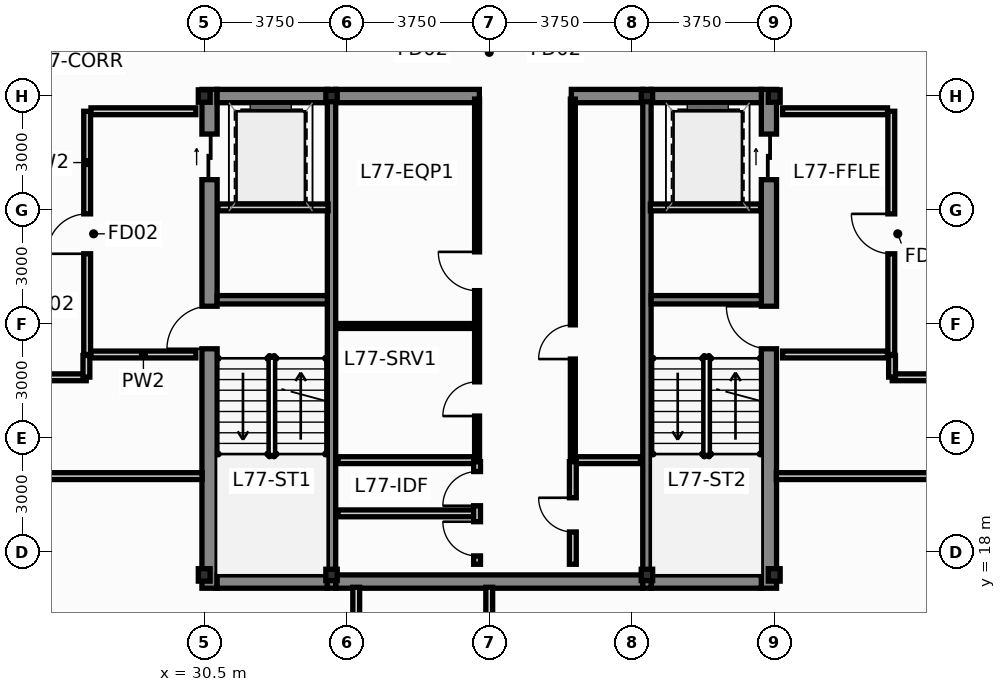
"""IFC4 building model, lengths in metres.
Left out: names, types, materials, properties, quantities, classifications, styles, units other than length and angle.
Written with IfcOpenShell. Run it as: python <this file> out.ifc"""

import sys

from ifc_helpers import new_model, si_unit, direction, frame, frame_2d, origin, origin_2d, place, context, subcontext, project, spatial, rectangle, hollow_rectangle, i_section, extrude, source, transform, mapped, element, fill, save


model = new_model("IFC4")
c1 = context("Model", 3, precision=1e-05, world=origin(), true_north=direction((0.0, 1.0)))
c2 = subcontext(c1, "Body", "Model", "MODEL_VIEW")
j1 = project(units=[si_unit("LENGTHUNIT", "METRE"), si_unit("PLANEANGLEUNIT", "RADIAN")], contexts=[c1])
p1 = place(None, origin())
s1 = spatial("IfcSite", under=j1, at=p1, CompositionType="ELEMENT")
p2 = place(p1, origin())
s2 = spatial("IfcBuilding", under=s1, at=p2, CompositionType="ELEMENT")
p3 = place(p2, frame((0.0, 0.0, 293.2)))
s3 = spatial("IfcBuildingStorey", under=s2, at=p3, CompositionType="ELEMENT", Elevation=293.2)
m1 = source(origin(), c2, "Body", "SweptSolid", [
    extrude(i_section(OverallWidth=0.311, OverallDepth=0.327, WebThickness=0.016, FlangeThickness=0.025, at=origin_2d()), origin(), (0.0, 0.0, 1.0), 3.4),
])
for number, where, z_axis, x_axis in (
    (1, (30.5, 17.4, 0.0), (0.0, 0.0, 1.0), (1.0, 0.0, 0.0)),
    (2, (45.5, 17.4, 0.0), (0.0, 0.0, 1.0), (1.0, 0.0, 0.0)),
    (3, (45.5, 30.0, 0.0), (0.0, 0.0, 1.0), (1.0, 0.0, 0.0)),
    (4, (30.5, 30.0, 0.0), (0.0, 0.0, 1.0), (1.0, 0.0, 0.0)),
):
    element("IfcColumn", number, at=place(p3, frame(where, z_axis=z_axis, x_axis=x_axis)), inside=s3, PredefinedType="COLUMN", context=c2, shape_type="MappedRepresentation", body=[
        mapped(m1, transform((0.0, 0.0, 0.0), scale=1.0)),
    ])
m2 = source(origin(), c2, "Body", "SweptSolid", [
    extrude(hollow_rectangle(XDim=0.3, YDim=0.3, WallThickness=0.012, at=origin_2d()), origin(), (0.0, 0.0, 1.0), 3.4),
])
for number, where, z_axis, x_axis in (
    (5, (33.85, 17.4, 0.0), (0.0, 0.0, 1.0), (1.0, 0.0, 0.0)),
    (6, (42.15, 17.4, 0.0), (0.0, 0.0, 1.0), (1.0, 0.0, 0.0)),
    (7, (33.85, 30.0, 0.0), (0.0, 0.0, 1.0), (1.0, 0.0, 0.0)),
    (8, (42.15, 30.0, 0.0), (0.0, 0.0, 1.0), (1.0, 0.0, 0.0)),
):
    element("IfcColumn", number, at=place(p3, frame(where, z_axis=z_axis, x_axis=x_axis)), inside=s3, PredefinedType="COLUMN", context=c2, shape_type="MappedRepresentation", body=[
        mapped(m2, transform((0.0, 0.0, 0.0), scale=1.0)),
    ])
p4 = place(p3, frame((30.64, 17.05, 0.0), z_axis=(0.0, 0.0, 1.0), x_axis=(0.0, 1.0, 0.0)))
e9 = element("IfcWall", 9, at=p4, inside=s3, PredefinedType="SHEAR", context=c2, shape_type="SweptSolid", body=[
    extrude(rectangle(XDim=13.125, YDim=0.4, at=frame_2d((6.562, 0.0))), origin(), (0.0, 0.0, 1.0), 3.4),
])
p5 = place(p4, frame((6.3, 0.0, 0.0)))
e10 = element("IfcOpeningElement", 10, at=p5, cuts=e9, PredefinedType="OPENING", context=c2, shape_type="SweptSolid", body=[
    extrude(rectangle(XDim=1.12, YDim=2.15, at=frame_2d((0.56, 1.075))), frame((0.0, 0.212, 0.0), z_axis=(0.0, -1.0, 0.0), x_axis=(1.0, 0.0, 0.0)), (0.0, 0.0, 1.0), 0.424),
])
p6 = place(p4, frame((10.75, 0.0, 0.0)))
e11 = element("IfcOpeningElement", 11, at=p6, cuts=e9, PredefinedType="OPENING", context=c2, shape_type="SweptSolid", body=[
    extrude(rectangle(XDim=1.2, YDim=2.2, at=frame_2d((0.6, 1.1))), frame((0.0, 0.212, 0.0), z_axis=(0.0, -1.0, 0.0), x_axis=(1.0, 0.0, 0.0)), (0.0, 0.0, 1.0), 0.424),
])
p7 = place(p3, frame((45.36, 17.05, 0.0), z_axis=(0.0, 0.0, 1.0), x_axis=(0.0, 1.0, 0.0)))
e12 = element("IfcWall", 12, at=p7, inside=s3, PredefinedType="SHEAR", context=c2, shape_type="SweptSolid", body=[
    extrude(rectangle(XDim=13.125, YDim=0.4, at=frame_2d((6.562, 0.0))), origin(), (0.0, 0.0, 1.0), 3.4),
])
p8 = place(p7, frame((6.3, 0.0, 0.0)))
e13 = element("IfcOpeningElement", 13, at=p8, cuts=e12, PredefinedType="OPENING", context=c2, shape_type="SweptSolid", body=[
    extrude(rectangle(XDim=1.12, YDim=2.15, at=frame_2d((0.56, 1.075))), frame((0.0, 0.212, 0.0), z_axis=(0.0, -1.0, 0.0), x_axis=(1.0, 0.0, 0.0)), (0.0, 0.0, 1.0), 0.424),
])
p9 = place(p7, frame((10.75, 0.0, 0.0)))
e14 = element("IfcOpeningElement", 14, at=p9, cuts=e12, PredefinedType="OPENING", context=c2, shape_type="SweptSolid", body=[
    extrude(rectangle(XDim=1.2, YDim=2.2, at=frame_2d((0.6, 1.1))), frame((0.0, 0.212, 0.0), z_axis=(0.0, -1.0, 0.0), x_axis=(1.0, 0.0, 0.0)), (0.0, 0.0, 1.0), 0.424),
])
p10 = place(p3, frame((30.84, 17.225, 0.0), z_axis=(0.0, 0.0, 1.0), x_axis=(1.0, 0.0, 0.0)))
e15 = element("IfcWall", 15, at=p10, inside=s3, PredefinedType="SHEAR", context=c2, shape_type="SweptSolid", body=[
    extrude(rectangle(XDim=2.9, YDim=0.35, at=frame_2d((1.45, 0.0))), origin(), (0.0, 0.0, 1.0), 3.4),
])
p11 = place(p3, frame((33.96, 17.225, 0.0), z_axis=(0.0, 0.0, 1.0), x_axis=(1.0, 0.0, 0.0)))
e16 = element("IfcWall", 16, at=p11, inside=s3, PredefinedType="SHEAR", context=c2, shape_type="SweptSolid", body=[
    extrude(rectangle(XDim=8.08, YDim=0.35, at=frame_2d((4.04, 0.0))), origin(), (0.0, 0.0, 1.0), 3.4),
])
for number, where, z_axis, x_axis in (
    (17, (42.26, 17.225, 0.0), (0.0, 0.0, 1.0), (1.0, 0.0, 0.0)),
    (18, (30.84, 30.0, 0.0), (0.0, 0.0, 1.0), (1.0, 0.0, 0.0)),
):
    element("IfcWall", number, at=place(p3, frame(where, z_axis=z_axis, x_axis=x_axis)), inside=s3, PredefinedType="SHEAR", context=c2, shape_type="SweptSolid", body=[
        extrude(rectangle(XDim=2.9, YDim=0.35, at=frame_2d((1.45, 0.0))), origin(), (0.0, 0.0, 1.0), 3.4),
    ])
p12 = place(p3, frame((33.96, 30.0, 0.0), z_axis=(0.0, 0.0, 1.0), x_axis=(1.0, 0.0, 0.0)))
e19 = element("IfcWall", 19, at=p12, inside=s3, PredefinedType="SHEAR", context=c2, shape_type="SweptSolid", body=[
    extrude(rectangle(XDim=3.78, YDim=0.35, at=frame_2d((1.89, 0.0))), origin(), (0.0, 0.0, 1.0), 3.4),
])
p13 = place(p3, frame((40.16, 30.0, 0.0), z_axis=(0.0, 0.0, 1.0), x_axis=(1.0, 0.0, 0.0)))
e20 = element("IfcWall", 20, at=p13, inside=s3, PredefinedType="SHEAR", context=c2, shape_type="SweptSolid", body=[
    extrude(rectangle(XDim=1.88, YDim=0.35, at=frame_2d((0.94, 0.0))), origin(), (0.0, 0.0, 1.0), 3.4),
])
p14 = place(p3, frame((42.26, 30.0, 0.0), z_axis=(0.0, 0.0, 1.0), x_axis=(1.0, 0.0, 0.0)))
e21 = element("IfcWall", 21, at=p14, inside=s3, PredefinedType="SHEAR", context=c2, shape_type="SweptSolid", body=[
    extrude(rectangle(XDim=2.9, YDim=0.35, at=frame_2d((1.45, 0.0))), origin(), (0.0, 0.0, 1.0), 3.4),
])
for number, where, z_axis, x_axis in (
    (22, (33.85, 17.05, 0.0), (0.0, 0.0, 1.0), (0.0, 1.0, 0.0)),
    (23, (42.15, 17.05, 0.0), (0.0, 0.0, 1.0), (0.0, 1.0, 0.0)),
):
    element("IfcWall", number, at=place(p3, frame(where, z_axis=z_axis, x_axis=x_axis)), inside=s3, PredefinedType="SHEAR", context=c2, shape_type="SweptSolid", body=[
        extrude(rectangle(XDim=13.125, YDim=0.22, at=frame_2d((6.562, 0.0))), origin(), (0.0, 0.0, 1.0), 3.4),
    ])
for number, where, z_axis, x_axis in (
    (24, (30.84, 24.64, 0.0), (0.0, 0.0, 1.0), (1.0, 0.0, 0.0)),
    (25, (42.26, 24.64, 0.0), (0.0, 0.0, 1.0), (1.0, 0.0, 0.0)),
):
    element("IfcWall", number, at=place(p3, frame(where, z_axis=z_axis, x_axis=x_axis)), inside=s3, PredefinedType="SHEAR", context=c2, shape_type="SweptSolid", body=[
        extrude(rectangle(XDim=2.9, YDim=0.22, at=frame_2d((1.45, 0.0))), origin(), (0.0, 0.0, 1.0), 3.4),
    ])
p15 = place(p3, frame((27.42, 23.2, 0.0), z_axis=(0.0, 0.0, 1.0), x_axis=(0.0, 1.0, 0.0)))
e26 = element("IfcWall", 26, at=p15, inside=s3, PredefinedType="PARTITIONING", context=c2, shape_type="SweptSolid", body=[
    extrude(rectangle(XDim=6.4, YDim=0.18, at=frame_2d((3.2, 0.0))), origin(), (0.0, 0.0, 1.0), 2.835),
])
p16 = place(p15, frame((2.65, 0.0, 0.0)))
e27 = element("IfcOpeningElement", 27, at=p16, cuts=e26, PredefinedType="OPENING", context=c2, shape_type="SweptSolid", body=[
    extrude(rectangle(XDim=1.05, YDim=2.15, at=frame_2d((0.525, 1.075))), frame((0.0, 0.102, 0.0), z_axis=(0.0, -1.0, 0.0), x_axis=(1.0, 0.0, 0.0)), (0.0, 0.0, 1.0), 0.204),
])
for number, where, z_axis, x_axis in (
    (28, (27.52, 23.2, 0.0), (0.0, 0.0, 1.0), (1.0, 0.0, 0.0)),
    (29, (27.52, 29.6, 0.0), (0.0, 0.0, 1.0), (1.0, 0.0, 0.0)),
):
    element("IfcWall", number, at=place(p3, frame(where, z_axis=z_axis, x_axis=x_axis)), inside=s3, PredefinedType="PARTITIONING", context=c2, shape_type="SweptSolid", body=[
        extrude(rectangle(XDim=2.76, YDim=0.18, at=frame_2d((1.38, 0.0))), origin(), (0.0, 0.0, 1.0), 3.15),
    ])
p17 = place(p3, frame((48.58, 23.2, 0.0), z_axis=(0.0, 0.0, 1.0), x_axis=(0.0, 1.0, 0.0)))
e30 = element("IfcWall", 30, at=p17, inside=s3, PredefinedType="PARTITIONING", context=c2, shape_type="SweptSolid", body=[
    extrude(rectangle(XDim=6.4, YDim=0.18, at=frame_2d((3.2, 0.0))), origin(), (0.0, 0.0, 1.0), 2.835),
])
p18 = place(p17, frame((2.65, 0.0, 0.0)))
e31 = element("IfcOpeningElement", 31, at=p18, cuts=e30, PredefinedType="OPENING", context=c2, shape_type="SweptSolid", body=[
    extrude(rectangle(XDim=1.05, YDim=2.15, at=frame_2d((0.525, 1.075))), frame((0.0, 0.102, 0.0), z_axis=(0.0, -1.0, 0.0), x_axis=(1.0, 0.0, 0.0)), (0.0, 0.0, 1.0), 0.204),
])
for number, where, z_axis, x_axis in (
    (32, (45.72, 23.2, 0.0), (0.0, 0.0, 1.0), (1.0, 0.0, 0.0)),
    (33, (45.72, 29.6, 0.0), (0.0, 0.0, 1.0), (1.0, 0.0, 0.0)),
):
    element("IfcWall", number, at=place(p3, frame(where, z_axis=z_axis, x_axis=x_axis)), inside=s3, PredefinedType="PARTITIONING", context=c2, shape_type="SweptSolid", body=[
        extrude(rectangle(XDim=2.76, YDim=0.18, at=frame_2d((1.38, 0.0))), origin(), (0.0, 0.0, 1.0), 3.15),
    ])
for number, where, z_axis, x_axis in (
    (34, (30.86, 27.07, 0.0), (0.0, 0.0, 1.0), (1.0, 0.0, 0.0)),
    (35, (42.24, 27.07, 0.0), (0.0, 0.0, 1.0), (1.0, 0.0, 0.0)),
):
    element("IfcWall", number, at=place(p3, frame(where, z_axis=z_axis, x_axis=x_axis)), inside=s3, PredefinedType="PARTITIONING", context=c2, shape_type="SweptSolid", body=[
        extrude(rectangle(XDim=2.9, YDim=0.18, at=frame_2d((1.45, 0.0))), origin(), (0.0, 0.0, 1.0), 3.15),
    ])
p19 = place(p3, frame((34.02, 20.42, 0.0), z_axis=(0.0, 0.0, 1.0), x_axis=(1.0, 0.0, 0.0)))
e36 = element("IfcWall", 36, at=p19, inside=s3, PredefinedType="PARTITIONING", context=c2, shape_type="SweptSolid", body=[
    extrude(rectangle(XDim=3.64, YDim=0.18, at=frame_2d((1.82, 0.0))), origin(), (0.0, 0.0, 1.0), 3.15),
])
p20 = place(p3, frame((40.22, 20.42, 0.0), z_axis=(0.0, 0.0, 1.0), x_axis=(1.0, 0.0, 0.0)))
e37 = element("IfcWall", 37, at=p20, inside=s3, PredefinedType="PARTITIONING", context=c2, shape_type="SweptSolid", body=[
    extrude(rectangle(XDim=1.76, YDim=0.18, at=frame_2d((0.88, 0.0))), origin(), (0.0, 0.0, 1.0), 3.15),
])
p21 = place(p3, frame((34.02, 23.95, 0.0), z_axis=(0.0, 0.0, 1.0), x_axis=(1.0, 0.0, 0.0)))
e38 = element("IfcWall", 38, at=p21, inside=s3, PredefinedType="PARTITIONING", context=c2, shape_type="SweptSolid", body=[
    extrude(rectangle(XDim=3.58, YDim=0.13, at=frame_2d((1.79, 0.0))), origin(), (0.0, 0.0, 1.0), 3.15),
])
p22 = place(p3, frame((37.68, 20.48, 0.0), z_axis=(0.0, 0.0, 1.0), x_axis=(0.0, 1.0, 0.0)))
e39 = element("IfcWall", 39, at=p22, inside=s3, PredefinedType="PARTITIONING", context=c2, shape_type="SweptSolid", body=[
    extrude(rectangle(XDim=9.44, YDim=0.13, at=frame_2d((4.72, 0.0))), origin(), (0.0, 0.0, 1.0), 3.15),
])
p23 = place(p22, frame((1.1, 0.0, 0.0)))
e40 = element("IfcOpeningElement", 40, at=p23, cuts=e39, PredefinedType="OPENING", context=c2, shape_type="SweptSolid", body=[
    extrude(rectangle(XDim=0.9, YDim=2.1, at=frame_2d((0.45, 1.05))), frame((0.0, 0.077, 0.0), z_axis=(0.0, -1.0, 0.0), x_axis=(1.0, 0.0, 0.0)), (0.0, 0.0, 1.0), 0.154),
])
p24 = place(p22, frame((4.4, 0.0, 0.0)))
e41 = element("IfcOpeningElement", 41, at=p24, cuts=e39, PredefinedType="OPENING", context=c2, shape_type="SweptSolid", body=[
    extrude(rectangle(XDim=1.02, YDim=2.15, at=frame_2d((0.51, 1.075))), frame((0.0, 0.077, 0.0), z_axis=(0.0, -1.0, 0.0), x_axis=(1.0, 0.0, 0.0)), (0.0, 0.0, 1.0), 0.154),
])
p25 = place(p3, frame((40.2, 20.48, 0.0), z_axis=(0.0, 0.0, 1.0), x_axis=(0.0, 1.0, 0.0)))
e42 = element("IfcWall", 42, at=p25, inside=s3, PredefinedType="PARTITIONING", context=c2, shape_type="SweptSolid", body=[
    extrude(rectangle(XDim=9.44, YDim=0.13, at=frame_2d((4.72, 0.0))), origin(), (0.0, 0.0, 1.0), 3.15),
])
p26 = place(p25, frame((2.6, 0.0, 0.0)))
e43 = element("IfcOpeningElement", 43, at=p26, cuts=e42, PredefinedType="OPENING", context=c2, shape_type="SweptSolid", body=[
    extrude(rectangle(XDim=0.9, YDim=2.1, at=frame_2d((0.45, 1.05))), frame((0.0, 0.077, 0.0), z_axis=(0.0, -1.0, 0.0), x_axis=(1.0, 0.0, 0.0)), (0.0, 0.0, 1.0), 0.154),
])
p27 = place(p3, frame((34.02, 19.02, 0.0), z_axis=(0.0, 0.0, 1.0), x_axis=(1.0, 0.0, 0.0)))
e44 = element("IfcWall", 44, at=p27, inside=s3, PredefinedType="PARTITIONING", context=c2, shape_type="SweptSolid", body=[
    extrude(rectangle(XDim=3.58, YDim=0.18, at=frame_2d((1.79, 0.0))), origin(), (0.0, 0.0, 1.0), 3.15),
])
p28 = place(p3, frame((37.68, 17.68, 0.0), z_axis=(0.0, 0.0, 1.0), x_axis=(0.0, 1.0, 0.0)))
e45 = element("IfcWall", 45, at=p28, inside=s3, PredefinedType="PARTITIONING", context=c2, shape_type="SweptSolid", body=[
    extrude(rectangle(XDim=2.7, YDim=0.18, at=frame_2d((1.35, 0.0))), origin(), (0.0, 0.0, 1.0), 3.15),
])
p29 = place(p28, frame((0.22, 0.0, 0.0)))
e46 = element("IfcOpeningElement", 46, at=p29, cuts=e45, PredefinedType="OPENING", context=c2, shape_type="SweptSolid", body=[
    extrude(rectangle(XDim=0.9, YDim=2.1, at=frame_2d((0.45, 1.05))), frame((0.0, 0.102, 0.0), z_axis=(0.0, -1.0, 0.0), x_axis=(1.0, 0.0, 0.0)), (0.0, 0.0, 1.0), 0.204),
])
p30 = place(p28, frame((1.54, 0.0, 0.0)))
e47 = element("IfcOpeningElement", 47, at=p30, cuts=e45, PredefinedType="OPENING", context=c2, shape_type="SweptSolid", body=[
    extrude(rectangle(XDim=0.9, YDim=2.1, at=frame_2d((0.45, 1.05))), frame((0.0, 0.102, 0.0), z_axis=(0.0, -1.0, 0.0), x_axis=(1.0, 0.0, 0.0)), (0.0, 0.0, 1.0), 0.204),
])
p31 = place(p3, frame((40.2, 17.68, 0.0), z_axis=(0.0, 0.0, 1.0), x_axis=(0.0, 1.0, 0.0)))
e48 = element("IfcWall", 48, at=p31, inside=s3, PredefinedType="PARTITIONING", context=c2, shape_type="SweptSolid", body=[
    extrude(rectangle(XDim=2.7, YDim=0.18, at=frame_2d((1.35, 0.0))), origin(), (0.0, 0.0, 1.0), 3.15),
])
p32 = place(p31, frame((0.85, 0.0, 0.0)))
e49 = element("IfcOpeningElement", 49, at=p32, cuts=e48, PredefinedType="OPENING", context=c2, shape_type="SweptSolid", body=[
    extrude(rectangle(XDim=0.9, YDim=2.1, at=frame_2d((0.45, 1.05))), frame((0.0, 0.102, 0.0), z_axis=(0.0, -1.0, 0.0), x_axis=(1.0, 0.0, 0.0)), (0.0, 0.0, 1.0), 0.204),
])
p33 = place(p3, frame((17.68, 20.0, 0.0), z_axis=(0.0, 0.0, 1.0), x_axis=(1.0, 0.0, 0.0)))
e50 = element("IfcWall", 50, at=p33, inside=s3, PredefinedType="PARTITIONING", context=c2, shape_type="SweptSolid", body=[
    extrude(rectangle(XDim=12.765, YDim=0.18, at=frame_2d((6.383, 0.0))), origin(), (0.0, 0.0, 1.0), 3.15),
])
p34 = place(p33, frame((5.857, 0.0, 0.0)))
e51 = element("IfcOpeningElement", 51, at=p34, cuts=e50, PredefinedType="OPENING", context=c2, shape_type="SweptSolid", body=[
    extrude(rectangle(XDim=1.05, YDim=2.15, at=frame_2d((0.525, 1.075))), frame((0.0, 0.102, 0.0), z_axis=(0.0, -1.0, 0.0), x_axis=(1.0, 0.0, 0.0)), (0.0, 0.0, 1.0), 0.204),
])
p35 = place(p3, frame((45.555, 20.0, 0.0), z_axis=(0.0, 0.0, 1.0), x_axis=(1.0, 0.0, 0.0)))
e52 = element("IfcWall", 52, at=p35, inside=s3, PredefinedType="PARTITIONING", context=c2, shape_type="SweptSolid", body=[
    extrude(rectangle(XDim=11.635, YDim=0.18, at=frame_2d((5.817, 0.0))), origin(), (0.0, 0.0, 1.0), 3.15),
])
p36 = place(p35, frame((5.292, 0.0, 0.0)))
e53 = element("IfcOpeningElement", 53, at=p36, cuts=e52, PredefinedType="OPENING", context=c2, shape_type="SweptSolid", body=[
    extrude(rectangle(XDim=1.05, YDim=2.15, at=frame_2d((0.525, 1.075))), frame((0.0, 0.102, 0.0), z_axis=(0.0, -1.0, 0.0), x_axis=(1.0, 0.0, 0.0)), (0.0, 0.0, 1.0), 0.204),
])
p37 = place(p3, frame((34.5, 8.85, 0.0), z_axis=(0.0, 0.0, 1.0), x_axis=(0.0, 1.0, 0.0)))
e54 = element("IfcWall", 54, at=p37, inside=s3, PredefinedType="PARTITIONING", context=c2, shape_type="SweptSolid", body=[
    extrude(rectangle(XDim=8.225, YDim=0.18, at=frame_2d((4.112, 0.0))), origin(), (0.0, 0.0, 1.0), 3.15),
])
p38 = place(p37, frame((3.587, 0.0, 0.0)))
e55 = element("IfcOpeningElement", 55, at=p38, cuts=e54, PredefinedType="OPENING", context=c2, shape_type="SweptSolid", body=[
    extrude(rectangle(XDim=1.05, YDim=2.15, at=frame_2d((0.525, 1.075))), frame((0.0, 0.102, 0.0), z_axis=(0.0, -1.0, 0.0), x_axis=(1.0, 0.0, 0.0)), (0.0, 0.0, 1.0), 0.204),
])
p39 = place(p3, frame((38.0, 8.94, 0.0), z_axis=(0.0, 0.0, 1.0), x_axis=(0.0, 1.0, 0.0)))
e56 = element("IfcWall", 56, at=p39, inside=s3, PredefinedType="PARTITIONING", context=c2, shape_type="SweptSolid", body=[
    extrude(rectangle(XDim=8.135, YDim=0.18, at=frame_2d((4.067, 0.0))), origin(), (0.0, 0.0, 1.0), 3.15),
])
for number, where, z_axis, x_axis in (
    (57, (27.395, 22.6, 0.0), (0.0, 0.0, 1.0), (-1.0, 0.0, 0.0)),
    (58, (48.605, 22.6, 0.0), (0.0, 0.0, 1.0), (1.0, 0.0, 0.0)),
):
    element("IfcWall", number, at=place(p3, frame(where, z_axis=z_axis, x_axis=x_axis)), inside=s3, PredefinedType="PARTITIONING", context=c2, shape_type="SweptSolid", body=[
        extrude(rectangle(XDim=1.99, YDim=0.18, at=frame_2d((0.995, 0.0))), origin(), (0.0, 0.0, 1.0), 3.15),
    ])
for number, where, z_axis, x_axis in (
    (59, (27.4, 23.175, 0.0), (0.0, 0.0, 1.0), (0.0, -1.0, 0.0)),
    (60, (48.6, 23.175, 0.0), (0.0, 0.0, 1.0), (0.0, -1.0, 0.0)),
):
    element("IfcWall", number, at=place(p3, frame(where, z_axis=z_axis, x_axis=x_axis)), inside=s3, PredefinedType="PARTITIONING", context=c2, shape_type="SweptSolid", body=[
        extrude(rectangle(XDim=0.57, YDim=0.18, at=frame_2d((0.285, 0.0))), origin(), (0.0, 0.0, 1.0), 2.835),
    ])
p40 = place(p5, origin())
e61 = element("IfcDoor", 61, at=p40, inside=s3, OperationType="SINGLE_SWING_LEFT", PredefinedType="DOOR", context=c2, shape_type="SweptSolid", body=[
    extrude(rectangle(XDim=1.12, YDim=2.15, at=frame_2d((0.56, 1.075))), frame((0.0, 0.025, 0.0), z_axis=(0.0, -1.0, 0.0), x_axis=(1.0, 0.0, 0.0)), (0.0, 0.0, 1.0), 0.05),
])
fill(e10, e61)
p41 = place(p6, origin())
e62 = element("IfcDoor", 62, at=p41, inside=s3, OperationType="SLIDING_TO_LEFT", PredefinedType="DOOR", context=c2, shape_type="SweptSolid", body=[
    extrude(rectangle(XDim=1.2, YDim=2.2, at=frame_2d((0.6, 1.1))), frame((0.0, 0.025, 0.0), z_axis=(0.0, -1.0, 0.0), x_axis=(1.0, 0.0, 0.0)), (0.0, 0.0, 1.0), 0.05),
])
fill(e11, e62)
p42 = place(p8, origin())
e63 = element("IfcDoor", 63, at=p42, inside=s3, OperationType="SINGLE_SWING_RIGHT", PredefinedType="DOOR", context=c2, shape_type="SweptSolid", body=[
    extrude(rectangle(XDim=1.12, YDim=2.15, at=frame_2d((0.56, 1.075))), frame((0.0, 0.025, 0.0), z_axis=(0.0, -1.0, 0.0), x_axis=(1.0, 0.0, 0.0)), (0.0, 0.0, 1.0), 0.05),
])
fill(e13, e63)
p43 = place(p9, origin())
e64 = element("IfcDoor", 64, at=p43, inside=s3, OperationType="SLIDING_TO_RIGHT", PredefinedType="DOOR", context=c2, shape_type="SweptSolid", body=[
    extrude(rectangle(XDim=1.2, YDim=2.2, at=frame_2d((0.6, 1.1))), frame((0.0, 0.025, 0.0), z_axis=(0.0, -1.0, 0.0), x_axis=(1.0, 0.0, 0.0)), (0.0, 0.0, 1.0), 0.05),
])
fill(e14, e64)
p44 = place(p16, origin())
e65 = element("IfcDoor", 65, at=p44, inside=s3, OperationType="SINGLE_SWING_LEFT", PredefinedType="DOOR", context=c2, shape_type="SweptSolid", body=[
    extrude(rectangle(XDim=1.05, YDim=2.15, at=frame_2d((0.525, 1.075))), frame((0.0, 0.025, 0.0), z_axis=(0.0, -1.0, 0.0), x_axis=(1.0, 0.0, 0.0)), (0.0, 0.0, 1.0), 0.05),
])
fill(e27, e65)
p45 = place(p18, origin())
e66 = element("IfcDoor", 66, at=p45, inside=s3, OperationType="SINGLE_SWING_RIGHT", PredefinedType="DOOR", context=c2, shape_type="SweptSolid", body=[
    extrude(rectangle(XDim=1.05, YDim=2.15, at=frame_2d((0.525, 1.075))), frame((0.0, 0.025, 0.0), z_axis=(0.0, -1.0, 0.0), x_axis=(1.0, 0.0, 0.0)), (0.0, 0.0, 1.0), 0.05),
])
fill(e31, e66)
p46 = place(p23, origin())
e67 = element("IfcDoor", 67, at=p46, inside=s3, OperationType="SINGLE_SWING_LEFT", PredefinedType="DOOR", context=c2, shape_type="SweptSolid", body=[
    extrude(rectangle(XDim=0.9, YDim=2.1, at=frame_2d((0.45, 1.05))), frame((0.0, 0.025, 0.0), z_axis=(0.0, -1.0, 0.0), x_axis=(1.0, 0.0, 0.0)), (0.0, 0.0, 1.0), 0.05),
])
fill(e40, e67)
p47 = place(p24, origin())
e68 = element("IfcDoor", 68, at=p47, inside=s3, OperationType="SINGLE_SWING_RIGHT", PredefinedType="DOOR", context=c2, shape_type="SweptSolid", body=[
    extrude(rectangle(XDim=1.02, YDim=2.15, at=frame_2d((0.51, 1.075))), frame((0.0, 0.025, 0.0), z_axis=(0.0, -1.0, 0.0), x_axis=(1.0, 0.0, 0.0)), (0.0, 0.0, 1.0), 0.05),
])
fill(e41, e68)
p48 = place(p26, origin())
e69 = element("IfcDoor", 69, at=p48, inside=s3, OperationType="SINGLE_SWING_LEFT", PredefinedType="DOOR", context=c2, shape_type="SweptSolid", body=[
    extrude(rectangle(XDim=0.9, YDim=2.1, at=frame_2d((0.45, 1.05))), frame((0.0, 0.025, 0.0), z_axis=(0.0, -1.0, 0.0), x_axis=(1.0, 0.0, 0.0)), (0.0, 0.0, 1.0), 0.05),
])
fill(e43, e69)
p49 = place(p29, origin())
e70 = element("IfcDoor", 70, at=p49, inside=s3, OperationType="SINGLE_SWING_RIGHT", PredefinedType="DOOR", context=c2, shape_type="SweptSolid", body=[
    extrude(rectangle(XDim=0.9, YDim=2.1, at=frame_2d((0.45, 1.05))), frame((0.0, 0.025, 0.0), z_axis=(0.0, -1.0, 0.0), x_axis=(1.0, 0.0, 0.0)), (0.0, 0.0, 1.0), 0.05),
])
fill(e46, e70)
p50 = place(p30, origin())
e71 = element("IfcDoor", 71, at=p50, inside=s3, OperationType="SINGLE_SWING_LEFT", PredefinedType="DOOR", context=c2, shape_type="SweptSolid", body=[
    extrude(rectangle(XDim=0.9, YDim=2.1, at=frame_2d((0.45, 1.05))), frame((0.0, 0.025, 0.0), z_axis=(0.0, -1.0, 0.0), x_axis=(1.0, 0.0, 0.0)), (0.0, 0.0, 1.0), 0.05),
])
fill(e47, e71)
p51 = place(p32, origin())
e72 = element("IfcDoor", 72, at=p51, inside=s3, OperationType="SINGLE_SWING_RIGHT", PredefinedType="DOOR", context=c2, shape_type="SweptSolid", body=[
    extrude(rectangle(XDim=0.9, YDim=2.1, at=frame_2d((0.45, 1.05))), frame((0.0, 0.025, 0.0), z_axis=(0.0, -1.0, 0.0), x_axis=(1.0, 0.0, 0.0)), (0.0, 0.0, 1.0), 0.05),
])
fill(e49, e72)
save(model, sys.argv[1])
